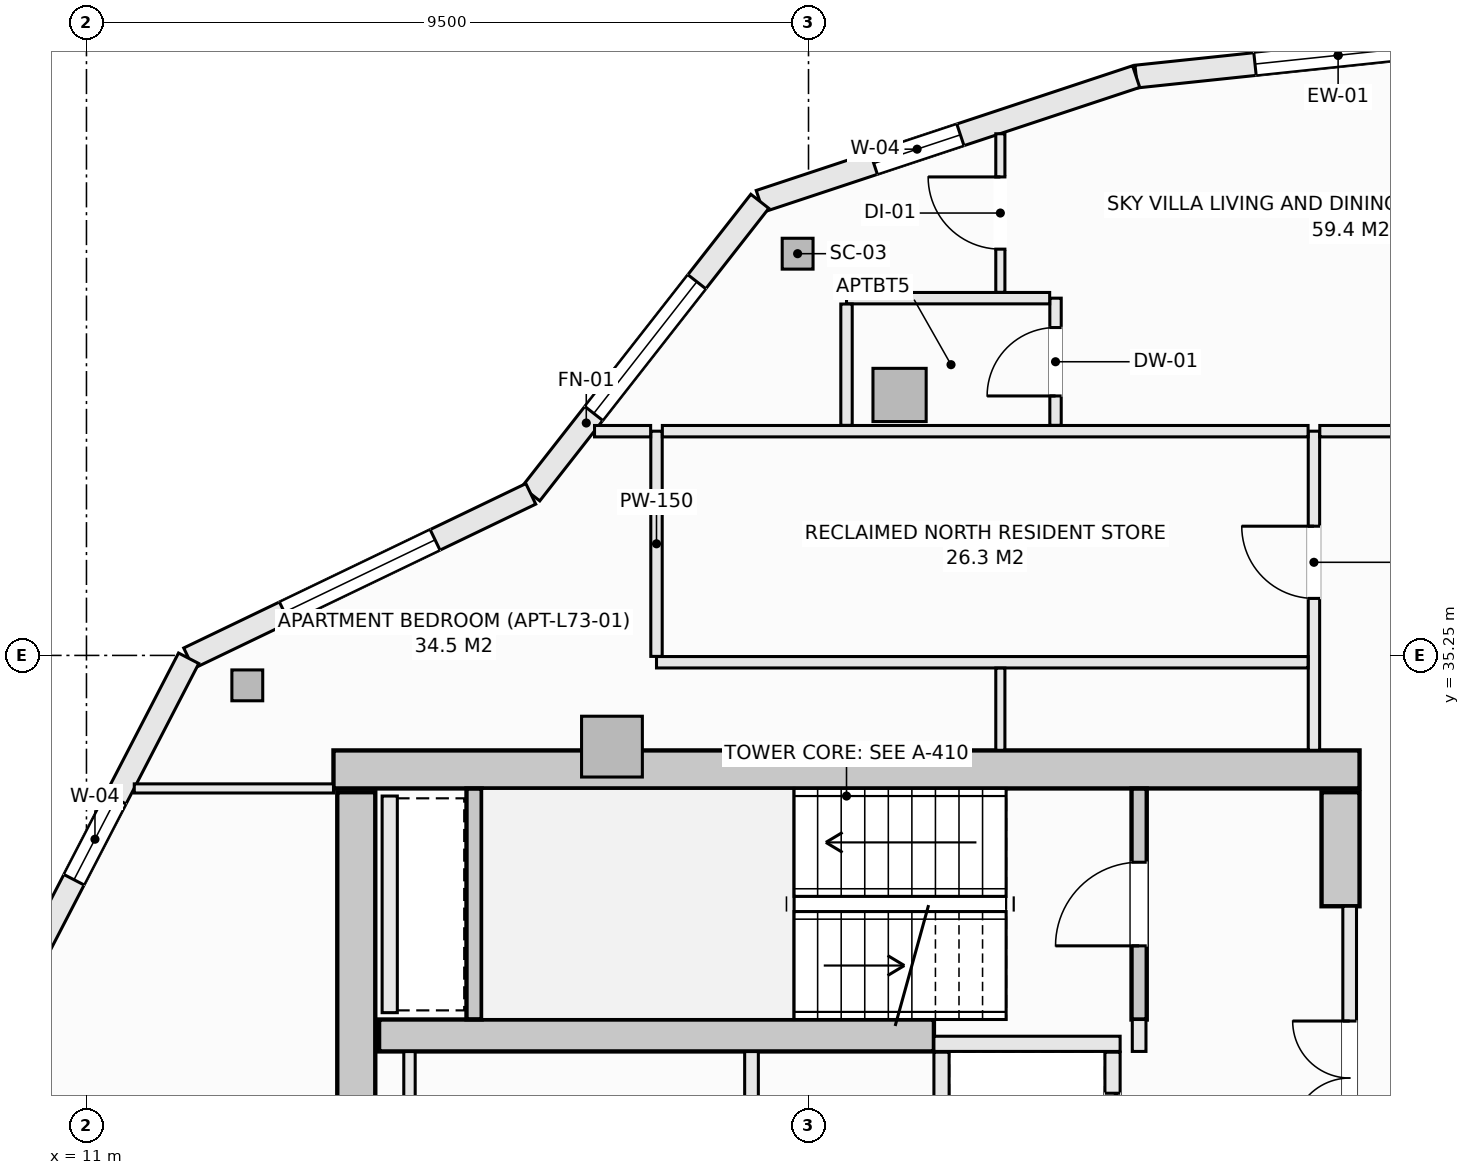
"""IFC4 building model, lengths in metres.
Left out: names, types, materials, properties, quantities, classifications, styles, units other than length and angle.
Written with IfcOpenShell. Run it as: python <this file> out.ifc"""

import sys

from ifc_helpers import new_model, si_unit, direction, frame, frame_2d, origin, origin_2d, place, context, subcontext, project, spatial, rectangle, hollow_rectangle, extrude, element, fill, save


model = new_model("IFC4")
c1 = context("Model", 3, precision=1e-05, world=origin(), true_north=direction((0.0, 1.0)))
c2 = subcontext(c1, "Body", "Model", "MODEL_VIEW")
j1 = project(units=[si_unit("LENGTHUNIT", "METRE"), si_unit("PLANEANGLEUNIT", "RADIAN")], contexts=[c1])
p1 = place(None, origin())
s1 = spatial("IfcSite", under=j1, at=p1, CompositionType="ELEMENT")
p2 = place(p1, origin())
s2 = spatial("IfcBuilding", under=s1, at=p2, CompositionType="ELEMENT")
p3 = place(p2, frame((0.0, 0.0, 269.0)))
s3 = spatial("IfcBuildingStorey", under=s2, at=p3, CompositionType="ELEMENT", Elevation=269.0)
p4 = place(p3, frame((14.25, 33.75, -0.27), z_axis=(0.0, 0.0, 1.0), x_axis=(1.0, 0.0, 0.0)))
e1 = element("IfcWall", 1, at=p4, inside=s3, PredefinedType="SHEAR", context=c2, shape_type="SweptSolid", body=[
    extrude(rectangle(XDim=13.5, YDim=0.5, at=frame_2d((6.75, 0.0))), origin(), (0.0, 0.0, 1.0), 3.3),
])
p5 = place(p3, frame((14.55, 20.55, -0.27), z_axis=(0.0, 0.0, 1.0), x_axis=(0.0, 1.0, 0.0)))
e2 = element("IfcWall", 2, at=p5, inside=s3, PredefinedType="SHEAR", context=c2, shape_type="SweptSolid", body=[
    extrude(rectangle(XDim=12.9, YDim=0.5, at=frame_2d((6.45, 0.0))), origin(), (0.0, 0.0, 1.0), 3.3),
])
p6 = place(p3, frame((27.5, 31.95, -0.27), z_axis=(0.0, 0.0, 1.0), x_axis=(0.0, 1.0, 0.0)))
e3 = element("IfcWall", 3, at=p6, inside=s3, PredefinedType="SHEAR", context=c2, shape_type="SweptSolid", body=[
    extrude(rectangle(XDim=1.5, YDim=0.5, at=frame_2d((0.75, 0.0))), origin(), (0.0, 0.0, 1.0), 3.3),
])
p7 = place(p3, frame((14.85, 30.25, -0.27), z_axis=(0.0, 0.0, 1.0), x_axis=(1.0, 0.0, 0.0)))
e4 = element("IfcWall", 4, at=p7, inside=s3, PredefinedType="SHEAR", context=c2, shape_type="SweptSolid", body=[
    extrude(rectangle(XDim=7.3, YDim=0.42, at=frame_2d((3.65, 0.0))), origin(), (0.0, 0.0, 1.0), 3.3),
])
for number, where, z_axis, x_axis in (
    (5, (20.357, 40.535, -0.27), (0.0, 0.0, 1.0), (1.0, 0.0, 0.0)),
    (6, (13.116, 34.856, -0.27), (0.0, 0.0, 1.0), (1.0, 0.0, 0.0)),
):
    element("IfcColumn", number, at=place(p3, frame(where, z_axis=z_axis, x_axis=x_axis)), inside=s3, PredefinedType="COLUMN", context=c2, shape_type="SweptSolid", body=[
        extrude(hollow_rectangle(XDim=0.406, YDim=0.406, WallThickness=0.016, at=origin_2d()), origin(), (0.0, 0.0, 1.0), 3.3),
    ])
p8 = place(p3, frame((21.698, 38.677, -0.27), z_axis=(0.0, 0.0, 1.0), x_axis=(1.0, 0.0, 0.0)))
e7 = element("IfcColumn", 7, at=p8, inside=s3, PredefinedType="COLUMN", context=c2, shape_type="SweptSolid", body=[
    extrude(rectangle(XDim=0.7, YDim=0.7, at=origin_2d()), origin(), (0.0, 0.0, 1.0), 3.3),
])
p9 = place(p3, frame((17.914, 34.05, -0.27), z_axis=(0.0, 0.0, 1.0), x_axis=(1.0, 0.0, 0.0)))
e8 = element("IfcColumn", 8, at=p9, inside=s3, PredefinedType="PILASTER", context=c2, shape_type="SweptSolid", body=[
    extrude(rectangle(XDim=0.8, YDim=0.8, at=origin_2d()), origin(), (0.0, 0.0, 1.0), 3.3),
])
p10 = place(p3, frame((24.811, 42.865, 0.0), z_axis=(0.0, 0.0, 1.0), x_axis=(0.9944966869, 0.104768028258, 0.0)))
e9 = element("IfcWall", 9, at=p10, inside=s3, PredefinedType="SOLIDWALL", context=c2, shape_type="SweptSolid", body=[
    extrude(rectangle(XDim=5.343, YDim=0.3, at=frame_2d((2.672, 0.0))), origin(), (0.0, 0.0, 1.0), 2.605),
])
p11 = place(p10, frame((1.572, 0.0, 0.72)))
e10 = element("IfcOpeningElement", 10, at=p11, cuts=e9, PredefinedType="OPENING", context=c2, shape_type="SweptSolid", body=[
    extrude(rectangle(XDim=2.2, YDim=1.65, at=frame_2d((1.1, 0.825))), frame((0.0, 0.16, 0.0), z_axis=(0.0, -1.0, 0.0), x_axis=(1.0, 0.0, 0.0)), (0.0, 0.0, 1.0), 0.32),
])
p12 = place(p3, frame((19.859, 41.225, 0.0), z_axis=(0.0, 0.0, 1.0), x_axis=(0.949252744709, 0.314514271001, 0.0)))
e11 = element("IfcWall", 11, at=p12, inside=s3, PredefinedType="SOLIDWALL", context=c2, shape_type="SweptSolid", body=[
    extrude(rectangle(XDim=5.216, YDim=0.3, at=frame_2d((2.608, 0.0))), origin(), (0.0, 0.0, 1.0), 2.605),
])
p13 = place(p12, frame((1.58, 0.0, 0.72)))
e12 = element("IfcOpeningElement", 12, at=p13, cuts=e11, PredefinedType="OPENING", context=c2, shape_type="SweptSolid", body=[
    extrude(rectangle(XDim=1.2, YDim=1.65, at=frame_2d((0.6, 0.825))), frame((0.0, 0.16, 0.0), z_axis=(0.0, -1.0, 0.0), x_axis=(1.0, 0.0, 0.0)), (0.0, 0.0, 1.0), 0.32),
])
p14 = place(p3, frame((16.846, 37.375, 0.0), z_axis=(0.0, 0.0, 1.0), x_axis=(0.616413297421, 0.78742278781, 0.0)))
e13 = element("IfcWall", 13, at=p14, inside=s3, PredefinedType="SOLIDWALL", context=c2, shape_type="SweptSolid", body=[
    extrude(rectangle(XDim=4.888, YDim=0.3, at=frame_2d((2.444, 0.0))), origin(), (0.0, 0.0, 1.0), 2.605),
])
p15 = place(p14, frame((1.344, 0.0, 0.72)))
e14 = element("IfcOpeningElement", 14, at=p15, cuts=e13, PredefinedType="OPENING", context=c2, shape_type="SweptSolid", body=[
    extrude(rectangle(XDim=2.2, YDim=1.65, at=frame_2d((1.1, 0.825))), frame((0.0, 0.16, 0.0), z_axis=(0.0, -1.0, 0.0), x_axis=(1.0, 0.0, 0.0)), (0.0, 0.0, 1.0), 0.32),
])
p16 = place(p3, frame((12.344, 35.212, 0.0), z_axis=(0.0, 0.0, 1.0), x_axis=(0.901346013132, 0.433099716706, 0.0)))
e15 = element("IfcWall", 15, at=p16, inside=s3, PredefinedType="SOLIDWALL", context=c2, shape_type="SweptSolid", body=[
    extrude(rectangle(XDim=4.994, YDim=0.3, at=frame_2d((2.497, 0.0))), origin(), (0.0, 0.0, 1.0), 2.605),
])
p17 = place(p16, frame((1.397, 0.0, 0.72)))
e16 = element("IfcOpeningElement", 16, at=p17, cuts=e15, PredefinedType="OPENING", context=c2, shape_type="SweptSolid", body=[
    extrude(rectangle(XDim=2.2, YDim=1.65, at=frame_2d((1.1, 0.825))), frame((0.0, 0.16, 0.0), z_axis=(0.0, -1.0, 0.0), x_axis=(1.0, 0.0, 0.0)), (0.0, 0.0, 1.0), 0.32),
])
p18 = place(p3, frame((10.293, 31.251, 0.0), z_axis=(0.0, 0.0, 1.0), x_axis=(0.459801070243, 0.888021945564, 0.0)))
e17 = element("IfcWall", 17, at=p18, inside=s3, PredefinedType="SOLIDWALL", context=c2, shape_type="SweptSolid", body=[
    extrude(rectangle(XDim=4.461, YDim=0.3, at=frame_2d((2.23, 0.0))), origin(), (0.0, 0.0, 1.0), 2.605),
])
p19 = place(p18, frame((1.18, 0.0, 0.72)))
e18 = element("IfcOpeningElement", 18, at=p19, cuts=e17, PredefinedType="OPENING", context=c2, shape_type="SweptSolid", body=[
    extrude(rectangle(XDim=1.2, YDim=1.65, at=frame_2d((0.6, 0.825))), frame((0.0, 0.16, 0.0), z_axis=(0.0, -1.0, 0.0), x_axis=(1.0, 0.0, 0.0)), (0.0, 0.0, 1.0), 0.32),
])
p20 = place(p3, frame((24.85, 30.46, -0.27), z_axis=(0.0, 0.0, 1.0), x_axis=(0.0, 1.0, 0.0)))
e19 = element("IfcWall", 19, at=p20, inside=s3, PredefinedType="SHEAR", context=c2, shape_type="SweptSolid", body=[
    extrude(rectangle(XDim=3.038, YDim=0.2, at=frame_2d((1.519, 0.0))), origin(), (0.0, 0.0, 1.0), 3.3),
])
p21 = place(p20, frame((0.969, 0.0, 0.27)))
e20 = element("IfcOpeningElement", 20, at=p21, cuts=e19, PredefinedType="OPENING", context=c2, shape_type="SweptSolid", body=[
    extrude(rectangle(XDim=1.1, YDim=2.15, at=frame_2d((0.55, 1.075))), frame((0.0, 0.11, 0.0), z_axis=(0.0, -1.0, 0.0), x_axis=(1.0, 0.0, 0.0)), (0.0, 0.0, 1.0), 0.22),
])
p22 = place(p3, frame((16.1, 30.462, -0.27), z_axis=(0.0, 0.0, 1.0), x_axis=(0.0, 1.0, 0.0)))
e21 = element("IfcWall", 21, at=p22, inside=s3, PredefinedType="SHEAR", context=c2, shape_type="SweptSolid", body=[
    extrude(rectangle(XDim=3.036, YDim=0.2, at=frame_2d((1.518, 0.0))), origin(), (0.0, 0.0, 1.0), 3.3),
])
p23 = place(p3, frame((22.15, 30.14, 0.0), z_axis=(0.0, 0.0, 1.0), x_axis=(1.0, 0.0, 0.0)))
e22 = element("IfcWall", 22, at=p23, inside=s3, PredefinedType="SOLIDWALL", context=c2, shape_type="SweptSolid", body=[
    extrude(rectangle(XDim=2.45, YDim=0.2, at=frame_2d((1.225, 0.0))), origin(), (0.0, 0.0, 1.0), 3.03),
])
p24 = place(p3, frame((22.25, 27.85, 0.0), z_axis=(0.0, 0.0, 1.0), x_axis=(0.0, 1.0, 0.0)))
e23 = element("IfcWall", 23, at=p24, inside=s3, PredefinedType="SOLIDWALL", context=c2, shape_type="SweptSolid", body=[
    extrude(rectangle(XDim=2.18, YDim=0.2, at=frame_2d((1.09, 0.0))), origin(), (0.0, 0.0, 1.0), 3.03),
])
p25 = place(p3, frame((24.5, 27.85, 0.0), z_axis=(0.0, 0.0, 1.0), x_axis=(0.0, 1.0, 0.0)))
e24 = element("IfcWall", 24, at=p25, inside=s3, PredefinedType="SOLIDWALL", context=c2, shape_type="SweptSolid", body=[
    extrude(rectangle(XDim=2.18, YDim=0.2, at=frame_2d((1.09, 0.0))), origin(), (0.0, 0.0, 1.0), 3.03),
])
p26 = place(p25, frame((0.54, 0.0, 0.0)))
e25 = element("IfcOpeningElement", 25, at=p26, cuts=e24, PredefinedType="OPENING", context=c2, shape_type="SweptSolid", body=[
    extrude(rectangle(XDim=1.1, YDim=2.2, at=frame_2d((0.55, 1.1))), frame((0.0, 0.11, 0.0), z_axis=(0.0, -1.0, 0.0), x_axis=(1.0, 0.0, 0.0)), (0.0, 0.0, 1.0), 0.22),
])
p27 = place(p3, frame((14.99, 30.55, 0.0), z_axis=(0.0, 0.0, 1.0), x_axis=(0.0, 1.0, 0.0)))
e26 = element("IfcWall", 26, at=p27, inside=s3, PredefinedType="SOLIDWALL", context=c2, shape_type="SweptSolid", body=[
    extrude(rectangle(XDim=2.85, YDim=0.2, at=frame_2d((1.425, 0.0))), origin(), (0.0, 0.0, 1.0), 3.03),
])
p28 = place(p3, frame((24.85, 30.04, 0.0), z_axis=(0.0, 0.0, 1.0), x_axis=(0.0, 1.0, 0.0)))
e27 = element("IfcWall", 27, at=p28, inside=s3, PredefinedType="SOLIDWALL", context=c2, shape_type="SweptSolid", body=[
    extrude(rectangle(XDim=0.42, YDim=0.18, at=frame_2d((0.21, 0.0))), origin(), (0.0, 0.0, 1.0), 3.03),
])
p29 = place(p3, frame((27.62, 22.05, 0.0), z_axis=(0.0, 0.0, 1.0), x_axis=(0.0, 1.0, 0.0)))
e28 = element("IfcWall", 28, at=p29, inside=s3, PredefinedType="SOLIDWALL", context=c2, shape_type="SweptSolid", body=[
    extrude(rectangle(XDim=9.9, YDim=0.18, at=frame_2d((4.95, 0.0))), origin(), (0.0, 0.0, 1.0), 3.03),
])
p30 = place(p29, frame((4.475, 0.0, 0.0)))
e29 = element("IfcOpeningElement", 29, at=p30, cuts=e28, PredefinedType="OPENING", context=c2, shape_type="SweptSolid", body=[
    extrude(rectangle(XDim=0.95, YDim=2.1, at=frame_2d((0.475, 1.05))), frame((0.0, 0.1, 0.0), z_axis=(0.0, -1.0, 0.0), x_axis=(1.0, 0.0, 0.0)), (0.0, 0.0, 1.0), 0.2),
])
p31 = place(p29, frame((6.89, 0.0, 0.0)))
e30 = element("IfcOpeningElement", 30, at=p31, cuts=e28, PredefinedType="OPENING", context=c2, shape_type="SweptSolid", body=[
    extrude(rectangle(XDim=1.5, YDim=2.2, at=frame_2d((0.75, 1.1))), frame((0.0, 0.1, 0.0), z_axis=(0.0, -1.0, 0.0), x_axis=(1.0, 0.0, 0.0)), (0.0, 0.0, 1.0), 0.2),
])
p32 = place(p29, frame((1.51, 0.0, 0.0)))
e31 = element("IfcOpeningElement", 31, at=p32, cuts=e28, PredefinedType="OPENING", context=c2, shape_type="SweptSolid", body=[
    extrude(rectangle(XDim=1.5, YDim=2.2, at=frame_2d((0.75, 1.1))), frame((0.0, 0.1, 0.0), z_axis=(0.0, -1.0, 0.0), x_axis=(1.0, 0.0, 0.0)), (0.0, 0.0, 1.0), 0.2),
])
p33 = place(p3, frame((15.25, 27.932, 0.0), z_axis=(0.0, 0.0, 1.0), x_axis=(0.0, 1.0, 0.0)))
e32 = element("IfcWall", 32, at=p33, inside=s3, PredefinedType="PARTITIONING", context=c2, shape_type="SweptSolid", body=[
    extrude(rectangle(XDim=2.106, YDim=0.15, at=frame_2d((1.053, 0.0))), origin(), (0.0, 0.0, 1.0), 3.03),
])
p34 = place(p3, frame((19.75, 27.932, 0.0), z_axis=(0.0, 0.0, 1.0), x_axis=(0.0, 1.0, 0.0)))
e33 = element("IfcWall", 33, at=p34, inside=s3, PredefinedType="SOLIDWALL", context=c2, shape_type="SweptSolid", body=[
    extrude(rectangle(XDim=2.106, YDim=0.18, at=frame_2d((1.053, 0.0))), origin(), (0.0, 0.0, 1.0), 3.03),
])
p35 = place(p3, frame((27.15, 34.002, 0.0), z_axis=(0.0, 0.0, 1.0), x_axis=(0.0, 1.0, 0.0)))
e34 = element("IfcWall", 34, at=p35, inside=s3, PredefinedType="PARTITIONING", context=c2, shape_type="SweptSolid", body=[
    extrude(rectangle(XDim=4.198, YDim=0.15, at=frame_2d((2.099, 0.0))), origin(), (0.0, 0.0, 1.0), 3.03),
])
p36 = place(p35, frame((1.998, 0.0, 0.0)))
e35 = element("IfcOpeningElement", 35, at=p36, cuts=e34, PredefinedType="OPENING", context=c2, shape_type="SweptSolid", body=[
    extrude(rectangle(XDim=0.95, YDim=2.1, at=frame_2d((0.475, 1.05))), frame((0.0, 0.085, 0.0), z_axis=(0.0, -1.0, 0.0), x_axis=(1.0, 0.0, 0.0)), (0.0, 0.0, 1.0), 0.17),
])
p37 = place(p3, frame((18.5, 35.16, 0.0), z_axis=(0.0, 0.0, 1.0), x_axis=(1.0, 0.0, 0.0)))
e36 = element("IfcWall", 36, at=p37, inside=s3, PredefinedType="PARTITIONING", context=c2, shape_type="SweptSolid", body=[
    extrude(rectangle(XDim=8.573, YDim=0.15, at=frame_2d((4.287, 0.0))), origin(), (0.0, 0.0, 1.0), 3.03),
])
p38 = place(p3, frame((18.5, 35.237, 0.0), z_axis=(0.0, 0.0, 1.0), x_axis=(0.0, 1.0, 0.0)))
e37 = element("IfcWall", 37, at=p38, inside=s3, PredefinedType="PARTITIONING", context=c2, shape_type="SweptSolid", body=[
    extrude(rectangle(XDim=2.963, YDim=0.15, at=frame_2d((1.481, 0.0))), origin(), (0.0, 0.0, 1.0), 3.03),
])
p39 = place(p3, frame((17.685, 38.2, 0.0), z_axis=(0.0, 0.0, 1.0), x_axis=(1.0, 0.0, 0.0)))
e38 = element("IfcWall", 38, at=p39, inside=s3, PredefinedType="PARTITIONING", context=c2, shape_type="SweptSolid", body=[
    extrude(rectangle(XDim=0.738, YDim=0.15, at=frame_2d((0.369, 0.0))), origin(), (0.0, 0.0, 1.0), 3.03),
])
p40 = place(p3, frame((18.577, 38.2, 0.0), z_axis=(0.0, 0.0, 1.0), x_axis=(1.0, 0.0, 0.0)))
e39 = element("IfcWall", 39, at=p40, inside=s3, PredefinedType="PARTITIONING", context=c2, shape_type="SweptSolid", body=[
    extrude(rectangle(XDim=8.496, YDim=0.15, at=frame_2d((4.248, 0.0))), origin(), (0.0, 0.0, 1.0), 3.03),
])
p41 = place(p3, frame((27.227, 38.2, 0.0), z_axis=(0.0, 0.0, 1.0), x_axis=(1.0, 0.0, 0.0)))
e40 = element("IfcWall", 40, at=p41, inside=s3, PredefinedType="PARTITIONING", context=c2, shape_type="SweptSolid", body=[
    extrude(rectangle(XDim=2.711, YDim=0.15, at=frame_2d((1.355, 0.0))), origin(), (0.0, 0.0, 1.0), 3.03),
])
p42 = place(p3, frame((11.629, 33.5, 0.0), z_axis=(0.0, 0.0, 1.0), x_axis=(1.0, 0.0, 0.0)))
e41 = element("IfcWall", 41, at=p42, inside=s3, PredefinedType="PARTITIONING", context=c2, shape_type="SweptSolid", body=[
    extrude(rectangle(XDim=2.621, YDim=0.12, at=frame_2d((1.311, 0.0))), origin(), (0.0, 0.0, 1.0), 3.03),
])
p43 = place(p3, frame((23.75, 38.277, 0.0), z_axis=(0.0, 0.0, 1.0), x_axis=(0.0, 1.0, 0.0)))
e42 = element("IfcWall", 42, at=p43, inside=s3, PredefinedType="PARTITIONING", context=c2, shape_type="SweptSolid", body=[
    extrude(rectangle(XDim=1.673, YDim=0.15, at=frame_2d((0.836, 0.0))), origin(), (0.0, 0.0, 1.0), 3.03),
])
p44 = place(p43, frame((0.386, 0.0, 0.0)))
e43 = element("IfcOpeningElement", 43, at=p44, cuts=e42, PredefinedType="OPENING", context=c2, shape_type="SweptSolid", body=[
    extrude(rectangle(XDim=0.9, YDim=2.1, at=frame_2d((0.45, 1.05))), frame((0.0, 0.085, 0.0), z_axis=(0.0, -1.0, 0.0), x_axis=(1.0, 0.0, 0.0)), (0.0, 0.0, 1.0), 0.17),
])
p45 = place(p3, frame((21.0, 39.95, 0.0), z_axis=(0.0, 0.0, 1.0), x_axis=(1.0, 0.0, 0.0)))
e44 = element("IfcWall", 44, at=p45, inside=s3, PredefinedType="PARTITIONING", context=c2, shape_type="SweptSolid", body=[
    extrude(rectangle(XDim=2.673, YDim=0.15, at=frame_2d((1.336, 0.0))), origin(), (0.0, 0.0, 1.0), 3.03),
])
p46 = place(p3, frame((23.024, 34.002, 0.0), z_axis=(0.0, 0.0, 1.0), x_axis=(0.0, 1.0, 0.0)))
e45 = element("IfcWall", 45, at=p46, inside=s3, PredefinedType="PARTITIONING", context=c2, shape_type="SweptSolid", body=[
    extrude(rectangle(XDim=1.081, YDim=0.12, at=frame_2d((0.541, 0.0))), origin(), (0.0, 0.0, 1.0), 3.03),
])
p47 = place(p3, frame((23.024, 40.027, 0.0), z_axis=(0.0, 0.0, 1.0), x_axis=(0.0, 1.0, 0.0)))
e46 = element("IfcWall", 46, at=p47, inside=s3, PredefinedType="PARTITIONING", context=c2, shape_type="SweptSolid", body=[
    extrude(rectangle(XDim=2.086, YDim=0.12, at=frame_2d((1.043, 0.0))), origin(), (0.0, 0.0, 1.0), 3.03),
])
p48 = place(p47, frame((0.568, 0.0, 0.0)))
e47 = element("IfcOpeningElement", 47, at=p48, cuts=e46, PredefinedType="OPENING", context=c2, shape_type="SweptSolid", body=[
    extrude(rectangle(XDim=0.95, YDim=2.1, at=frame_2d((0.475, 1.05))), frame((0.0, 0.07, 0.0), z_axis=(0.0, -1.0, 0.0), x_axis=(1.0, 0.0, 0.0)), (0.0, 0.0, 1.0), 0.14),
])
p49 = place(p3, frame((21.0, 38.277, 0.0), z_axis=(0.0, 0.0, 1.0), x_axis=(0.0, 1.0, 0.0)))
e48 = element("IfcWall", 48, at=p49, inside=s3, PredefinedType="PARTITIONING", context=c2, shape_type="SweptSolid", body=[
    extrude(rectangle(XDim=1.596, YDim=0.15, at=frame_2d((0.798, 0.0))), origin(), (0.0, 0.0, 1.0), 2.478),
])
p50 = place(p11, origin())
e49 = element("IfcWindow", 49, at=p50, inside=s3, PartitioningType="SINGLE_PANEL", PredefinedType="WINDOW", context=c2, shape_type="SweptSolid", body=[
    extrude(rectangle(XDim=2.2, YDim=1.65, at=frame_2d((1.1, 0.825))), frame((0.0, 0.03, 0.0), z_axis=(0.0, -1.0, 0.0), x_axis=(1.0, 0.0, 0.0)), (0.0, 0.0, 1.0), 0.06),
])
fill(e10, e49)
p51 = place(p13, origin())
e50 = element("IfcWindow", 50, at=p51, inside=s3, PartitioningType="SINGLE_PANEL", PredefinedType="WINDOW", context=c2, shape_type="SweptSolid", body=[
    extrude(rectangle(XDim=1.2, YDim=1.65, at=frame_2d((0.6, 0.825))), frame((0.0, 0.03, 0.0), z_axis=(0.0, -1.0, 0.0), x_axis=(1.0, 0.0, 0.0)), (0.0, 0.0, 1.0), 0.06),
])
fill(e12, e50)
p52 = place(p15, origin())
e51 = element("IfcWindow", 51, at=p52, inside=s3, PartitioningType="SINGLE_PANEL", PredefinedType="WINDOW", context=c2, shape_type="SweptSolid", body=[
    extrude(rectangle(XDim=2.2, YDim=1.65, at=frame_2d((1.1, 0.825))), frame((0.0, 0.03, 0.0), z_axis=(0.0, -1.0, 0.0), x_axis=(1.0, 0.0, 0.0)), (0.0, 0.0, 1.0), 0.06),
])
fill(e14, e51)
p53 = place(p17, origin())
e52 = element("IfcWindow", 52, at=p53, inside=s3, PartitioningType="SINGLE_PANEL", PredefinedType="WINDOW", context=c2, shape_type="SweptSolid", body=[
    extrude(rectangle(XDim=2.2, YDim=1.65, at=frame_2d((1.1, 0.825))), frame((0.0, 0.03, 0.0), z_axis=(0.0, -1.0, 0.0), x_axis=(1.0, 0.0, 0.0)), (0.0, 0.0, 1.0), 0.06),
])
fill(e16, e52)
p54 = place(p19, origin())
e53 = element("IfcWindow", 53, at=p54, inside=s3, PartitioningType="SINGLE_PANEL", PredefinedType="WINDOW", context=c2, shape_type="SweptSolid", body=[
    extrude(rectangle(XDim=1.2, YDim=1.65, at=frame_2d((0.6, 0.825))), frame((0.0, 0.03, 0.0), z_axis=(0.0, -1.0, 0.0), x_axis=(1.0, 0.0, 0.0)), (0.0, 0.0, 1.0), 0.06),
])
fill(e18, e53)
p55 = place(p21, origin())
e54 = element("IfcDoor", 54, at=p55, inside=s3, OperationType="SINGLE_SWING_LEFT", PredefinedType="DOOR", context=c2, shape_type="SweptSolid", body=[
    extrude(rectangle(XDim=1.1, YDim=2.15, at=frame_2d((0.55, 1.075))), frame((0.0, 0.025, 0.0), z_axis=(0.0, -1.0, 0.0), x_axis=(1.0, 0.0, 0.0)), (0.0, 0.0, 1.0), 0.05),
])
fill(e20, e54)
p56 = place(p26, origin())
e55 = element("IfcDoor", 55, at=p56, inside=s3, OperationType="SLIDING_TO_LEFT", PredefinedType="DOOR", context=c2, shape_type="SweptSolid", body=[
    extrude(rectangle(XDim=1.1, YDim=2.2, at=frame_2d((0.55, 1.1))), frame((0.0, 0.025, 0.0), z_axis=(0.0, -1.0, 0.0), x_axis=(1.0, 0.0, 0.0)), (0.0, 0.0, 1.0), 0.05),
])
fill(e25, e55)
p57 = place(p31, origin())
e56 = element("IfcDoor", 56, at=p57, inside=s3, OperationType="DOUBLE_DOOR_SINGLE_SWING", PredefinedType="DOOR", context=c2, shape_type="SweptSolid", body=[
    extrude(rectangle(XDim=1.5, YDim=2.2, at=frame_2d((0.75, 1.1))), frame((0.0, 0.025, 0.0), z_axis=(0.0, -1.0, 0.0), x_axis=(1.0, 0.0, 0.0)), (0.0, 0.0, 1.0), 0.05),
])
fill(e30, e56)
p58 = place(p36, origin())
e57 = element("IfcDoor", 57, at=p58, inside=s3, OperationType="SINGLE_SWING_RIGHT", PredefinedType="DOOR", context=c2, shape_type="SweptSolid", body=[
    extrude(rectangle(XDim=0.95, YDim=2.1, at=frame_2d((0.475, 1.05))), frame((0.0, 0.025, 0.0), z_axis=(0.0, -1.0, 0.0), x_axis=(1.0, 0.0, 0.0)), (0.0, 0.0, 1.0), 0.05),
])
fill(e35, e57)
p59 = place(p44, origin())
e58 = element("IfcDoor", 58, at=p59, inside=s3, OperationType="SINGLE_SWING_LEFT", PredefinedType="DOOR", context=c2, shape_type="SweptSolid", body=[
    extrude(rectangle(XDim=0.9, YDim=2.1, at=frame_2d((0.45, 1.05))), frame((0.0, 0.025, 0.0), z_axis=(0.0, -1.0, 0.0), x_axis=(1.0, 0.0, 0.0)), (0.0, 0.0, 1.0), 0.05),
])
fill(e43, e58)
p60 = place(p48, origin())
e59 = element("IfcDoor", 59, at=p60, inside=s3, OperationType="SINGLE_SWING_RIGHT", PredefinedType="DOOR", context=c2, shape_type="SweptSolid", body=[
    extrude(rectangle(XDim=0.95, YDim=2.1, at=frame_2d((0.475, 1.05))), frame((0.0, 0.025, 0.0), z_axis=(0.0, -1.0, 0.0), x_axis=(1.0, 0.0, 0.0)), (0.0, 0.0, 1.0), 0.05),
])
fill(e47, e59)
save(model, sys.argv[1])
